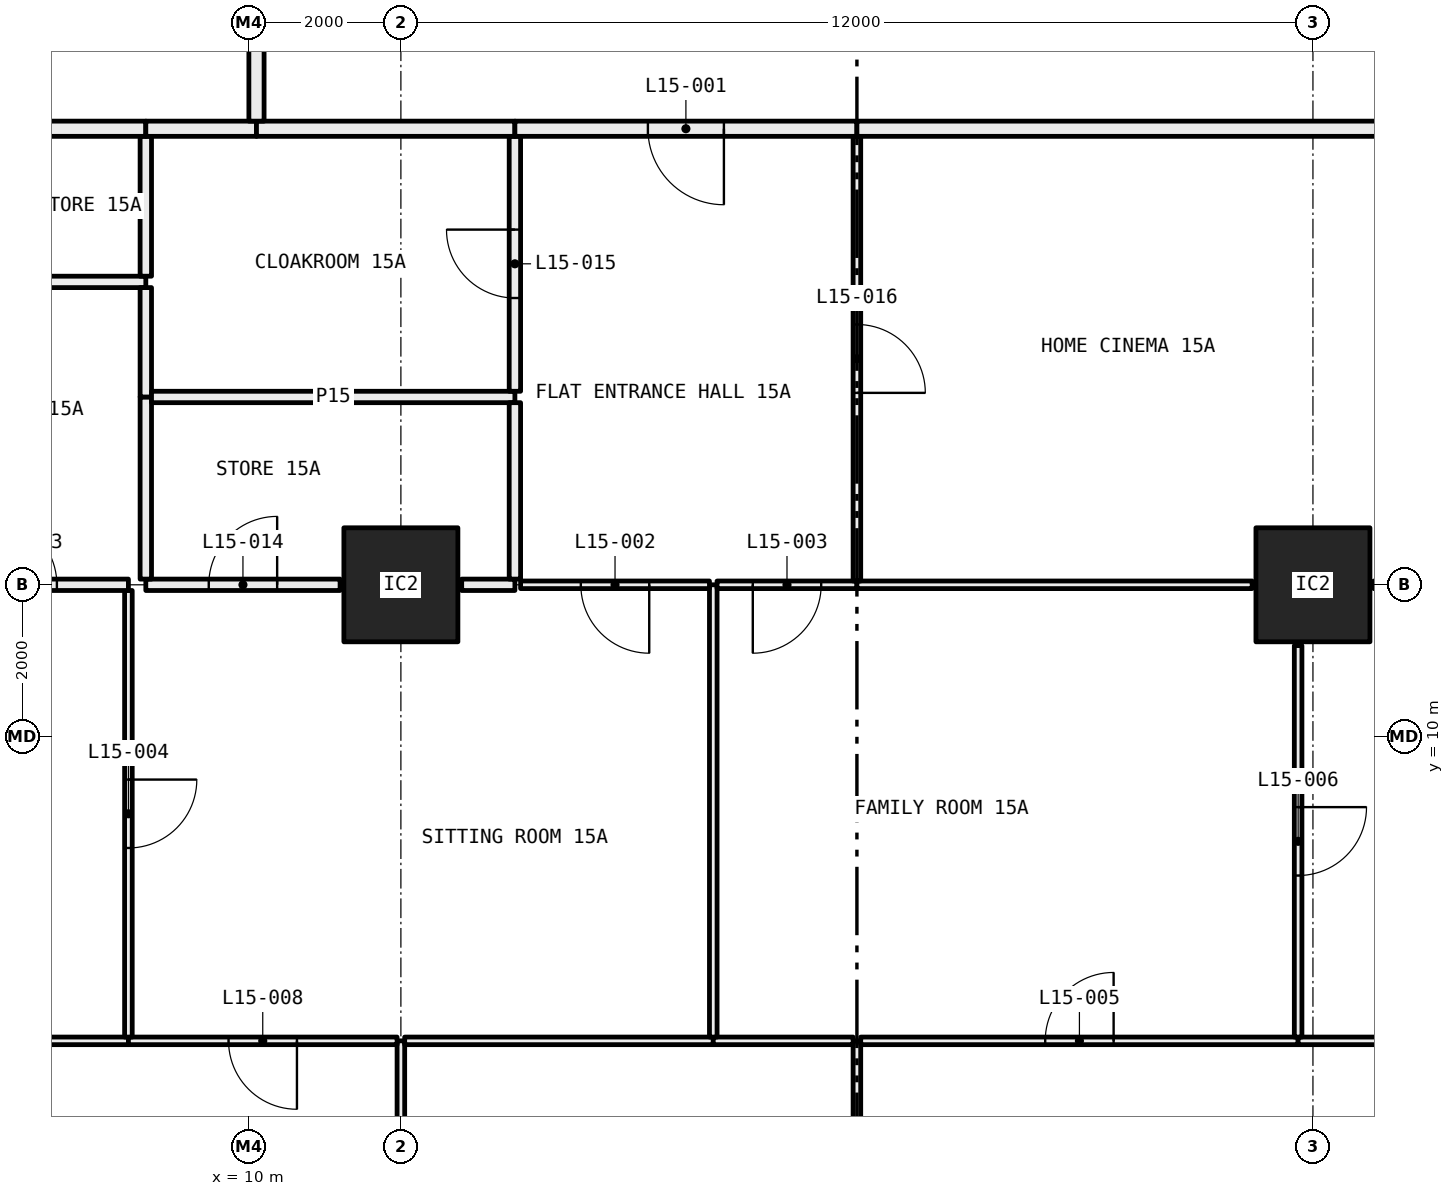
"""IFC4 building model, lengths in metres.
Left out: names, types, materials, properties, quantities, classifications, styles, units other than length and angle.
Written with IfcOpenShell. Run it as: python <this file> out.ifc"""

import sys

from ifc_helpers import new_model, si_unit, direction, frame, frame_2d, origin, origin_2d, place, context, subcontext, project, spatial, rectangle, hollow_rectangle, extrude, element, fill, save


model = new_model("IFC4")
c1 = context("Model", 3, precision=1e-05, world=origin(), true_north=direction((0.0, 1.0)))
c2 = subcontext(c1, "Body", "Model", "MODEL_VIEW")
j1 = project(units=[si_unit("LENGTHUNIT", "METRE"), si_unit("PLANEANGLEUNIT", "RADIAN")], contexts=[c1])
p1 = place(None, origin())
s1 = spatial("IfcSite", under=j1, at=p1, CompositionType="ELEMENT")
p2 = place(p1, origin())
s2 = spatial("IfcBuilding", under=s1, at=p2, CompositionType="ELEMENT")
p3 = place(p2, frame((0.0, 0.0, 64.5)))
s3 = spatial("IfcBuildingStorey", under=s2, at=p3, CompositionType="ELEMENT", Elevation=64.5)
for number, where, z_axis, x_axis in (
    (1, (12.0, 12.0, 0.0), (0.0, 0.0, 1.0), (1.0, 0.0, 0.0)),
    (2, (24.0, 12.0, 0.0), (0.0, 0.0, 1.0), (1.0, 0.0, 0.0)),
):
    element("IfcColumn", number, at=place(p3, frame(where, z_axis=z_axis, x_axis=x_axis)), inside=s3, PredefinedType="COLUMN", context=c2, shape_type="SweptSolid", body=[
        extrude(hollow_rectangle(XDim=1.5, YDim=1.5, WallThickness=0.065, at=origin_2d()), origin(), (0.0, 0.0, 1.0), 3.05),
    ])
p4 = place(p3, frame((12.0, 0.72, 0.0), z_axis=(0.0, 0.0, 1.0), x_axis=(0.0, 1.0, 0.0)))
e3 = element("IfcWall", 3, at=p4, inside=s3, PredefinedType="PARTITIONING", context=c2, shape_type="SweptSolid", body=[
    extrude(rectangle(XDim=5.28, YDim=0.1, at=frame_2d((2.64, 0.0))), origin(), (0.0, 0.0, 1.0), 2.45),
])
p5 = place(p3, frame((8.415, 6.0, 0.0), z_axis=(0.0, 0.0, 1.0), x_axis=(-1.0, 0.0, 0.0)))
e4 = element("IfcWall", 4, at=p5, inside=s3, PredefinedType="PARTITIONING", context=c2, shape_type="SweptSolid", body=[
    extrude(rectangle(XDim=1.695, YDim=0.1, at=frame_2d((0.848, 0.0))), origin(), (0.0, 0.0, 1.0), 3.05),
])
p6 = place(p3, frame((11.95, 6.0, 0.0), z_axis=(0.0, 0.0, 1.0), x_axis=(-1.0, 0.0, 0.0)))
e5 = element("IfcWall", 5, at=p6, inside=s3, PredefinedType="PARTITIONING", context=c2, shape_type="SweptSolid", body=[
    extrude(rectangle(XDim=3.535, YDim=0.1, at=frame_2d((1.768, 0.0))), origin(), (0.0, 0.0, 1.0), 2.45),
])
p7 = place(p6, frame((1.317, 0.0, 0.0)))
e6 = element("IfcOpeningElement", 6, at=p7, cuts=e5, PredefinedType="OPENING", context=c2, shape_type="SweptSolid", body=[
    extrude(rectangle(XDim=0.9, YDim=2.1, at=frame_2d((0.45, 1.05))), frame((0.0, 0.06, 0.0), z_axis=(0.0, -1.0, 0.0), x_axis=(1.0, 0.0, 0.0)), (0.0, 0.0, 1.0), 0.12),
])
p8 = place(p3, frame((18.0, 0.72, 0.0), z_axis=(0.0, 0.0, 1.0), x_axis=(0.0, 1.0, 0.0)))
e7 = element("IfcWall", 7, at=p8, inside=s3, PredefinedType="PARTITIONING", context=c2, shape_type="SweptSolid", body=[
    extrude(rectangle(XDim=5.28, YDim=0.1, at=frame_2d((2.64, 0.0))), origin(), (0.0, 0.0, 1.0), 3.05),
])
p9 = place(p8, frame((2.19, 0.0, 0.0)))
e8 = element("IfcOpeningElement", 8, at=p9, cuts=e7, PredefinedType="OPENING", context=c2, shape_type="SweptSolid", body=[
    extrude(rectangle(XDim=0.9, YDim=2.1, at=frame_2d((0.45, 1.05))), frame((0.0, 0.06, 0.0), z_axis=(0.0, -1.0, 0.0), x_axis=(1.0, 0.0, 0.0)), (0.0, 0.0, 1.0), 0.12),
])
p10 = place(p3, frame((16.11, 6.0, 0.0), z_axis=(0.0, 0.0, 1.0), x_axis=(-1.0, 0.0, 0.0)))
e9 = element("IfcWall", 9, at=p10, inside=s3, PredefinedType="PARTITIONING", context=c2, shape_type="SweptSolid", body=[
    extrude(rectangle(XDim=4.06, YDim=0.1, at=frame_2d((2.03, 0.0))), origin(), (0.0, 0.0, 1.0), 2.45),
])
p11 = place(p3, frame((17.95, 6.0, 0.0), z_axis=(0.0, 0.0, 1.0), x_axis=(-1.0, 0.0, 0.0)))
e10 = element("IfcWall", 10, at=p11, inside=s3, PredefinedType="PARTITIONING", context=c2, shape_type="SweptSolid", body=[
    extrude(rectangle(XDim=1.84, YDim=0.1, at=frame_2d((0.92, 0.0))), origin(), (0.0, 0.0, 1.0), 3.05),
])
p12 = place(p3, frame((23.805, 6.0, 0.0), z_axis=(0.0, 0.0, 1.0), x_axis=(-1.0, 0.0, 0.0)))
e11 = element("IfcWall", 11, at=p12, inside=s3, PredefinedType="PARTITIONING", context=c2, shape_type="SweptSolid", body=[
    extrude(rectangle(XDim=5.755, YDim=0.1, at=frame_2d((2.877, 0.0))), origin(), (0.0, 0.0, 1.0), 3.05),
])
p13 = place(p12, frame((2.427, 0.0, 0.0)))
e12 = element("IfcOpeningElement", 12, at=p13, cuts=e11, PredefinedType="OPENING", context=c2, shape_type="SweptSolid", body=[
    extrude(rectangle(XDim=0.9, YDim=2.1, at=frame_2d((0.45, 1.05))), frame((0.0, 0.06, 0.0), z_axis=(0.0, -1.0, 0.0), x_axis=(1.0, 0.0, 0.0)), (0.0, 0.0, 1.0), 0.12),
])
p14 = place(p3, frame((29.95, 6.0, 0.0), z_axis=(0.0, 0.0, 1.0), x_axis=(-1.0, 0.0, 0.0)))
e13 = element("IfcWall", 13, at=p14, inside=s3, PredefinedType="PARTITIONING", context=c2, shape_type="SweptSolid", body=[
    extrude(rectangle(XDim=6.145, YDim=0.1, at=frame_2d((3.073, 0.0))), origin(), (0.0, 0.0, 1.0), 2.45),
])
p15 = place(p3, frame((8.415, 6.05, 0.0), z_axis=(0.0, 0.0, 1.0), x_axis=(0.0, 1.0, 0.0)))
e14 = element("IfcWall", 14, at=p15, inside=s3, PredefinedType="PARTITIONING", context=c2, shape_type="SweptSolid", body=[
    extrude(rectangle(XDim=5.875, YDim=0.1, at=frame_2d((2.938, 0.0))), origin(), (0.0, 0.0, 1.0), 2.45),
])
p16 = place(p15, frame((2.488, 0.0, 0.0)))
e15 = element("IfcOpeningElement", 15, at=p16, cuts=e14, PredefinedType="OPENING", context=c2, shape_type="SweptSolid", body=[
    extrude(rectangle(XDim=0.9, YDim=2.1, at=frame_2d((0.45, 1.05))), frame((0.0, 0.06, 0.0), z_axis=(0.0, -1.0, 0.0), x_axis=(1.0, 0.0, 0.0)), (0.0, 0.0, 1.0), 0.12),
])
p17 = place(p3, frame((8.415, 12.0, 0.0), z_axis=(0.0, 0.0, 1.0), x_axis=(-1.0, 0.0, 0.0)))
e16 = element("IfcWall", 16, at=p17, inside=s3, PredefinedType="PARTITIONING", context=c2, shape_type="SweptSolid", body=[
    extrude(rectangle(XDim=2.782, YDim=0.15, at=frame_2d((1.391, 0.0))), origin(), (0.0, 0.0, 1.0), 2.45),
])
p18 = place(p17, frame((0.941, 0.0, 0.0)))
e17 = element("IfcOpeningElement", 17, at=p18, cuts=e16, PredefinedType="OPENING", context=c2, shape_type="SweptSolid", body=[
    extrude(rectangle(XDim=0.9, YDim=2.1, at=frame_2d((0.45, 1.05))), frame((0.0, 0.085, 0.0), z_axis=(0.0, -1.0, 0.0), x_axis=(1.0, 0.0, 0.0)), (0.0, 0.0, 1.0), 0.17),
])
p19 = place(p3, frame((16.11, 6.05, 0.0), z_axis=(0.0, 0.0, 1.0), x_axis=(0.0, 1.0, 0.0)))
e18 = element("IfcWall", 18, at=p19, inside=s3, PredefinedType="PARTITIONING", context=c2, shape_type="SweptSolid", body=[
    extrude(rectangle(XDim=5.95, YDim=0.1, at=frame_2d((2.975, 0.0))), origin(), (0.0, 0.0, 1.0), 2.45),
])
p20 = place(p3, frame((11.2, 12.0, 0.0), z_axis=(0.0, 0.0, 1.0), x_axis=(-1.0, 0.0, 0.0)))
e19 = element("IfcWall", 19, at=p20, inside=s3, PredefinedType="PARTITIONING", context=c2, shape_type="SweptSolid", body=[
    extrude(rectangle(XDim=2.556, YDim=0.15, at=frame_2d((1.278, 0.0))), origin(), (0.0, 0.0, 1.0), 2.45),
])
p21 = place(p20, frame((0.828, 0.0, 0.0)))
e20 = element("IfcOpeningElement", 20, at=p21, cuts=e19, PredefinedType="OPENING", context=c2, shape_type="SweptSolid", body=[
    extrude(rectangle(XDim=0.9, YDim=2.1, at=frame_2d((0.45, 1.05))), frame((0.0, 0.085, 0.0), z_axis=(0.0, -1.0, 0.0), x_axis=(1.0, 0.0, 0.0)), (0.0, 0.0, 1.0), 0.17),
])
p22 = place(p3, frame((13.5, 12.0, 0.0), z_axis=(0.0, 0.0, 1.0), x_axis=(-1.0, 0.0, 0.0)))
e21 = element("IfcWall", 21, at=p22, inside=s3, PredefinedType="PARTITIONING", context=c2, shape_type="SweptSolid", body=[
    extrude(rectangle(XDim=0.7, YDim=0.15, at=frame_2d((0.35, 0.0))), origin(), (0.0, 0.0, 1.0), 2.45),
])
p23 = place(p3, frame((16.06, 12.0, 0.0), z_axis=(0.0, 0.0, 1.0), x_axis=(-1.0, 0.0, 0.0)))
e22 = element("IfcWall", 22, at=p23, inside=s3, PredefinedType="PARTITIONING", context=c2, shape_type="SweptSolid", body=[
    extrude(rectangle(XDim=2.485, YDim=0.1, at=frame_2d((1.243, 0.0))), origin(), (0.0, 0.0, 1.0), 2.45),
])
p24 = place(p23, frame((0.792, 0.0, 0.0)))
e23 = element("IfcOpeningElement", 23, at=p24, cuts=e22, PredefinedType="OPENING", context=c2, shape_type="SweptSolid", body=[
    extrude(rectangle(XDim=0.9, YDim=2.1, at=frame_2d((0.45, 1.05))), frame((0.0, 0.06, 0.0), z_axis=(0.0, -1.0, 0.0), x_axis=(1.0, 0.0, 0.0)), (0.0, 0.0, 1.0), 0.12),
])
p25 = place(p3, frame((23.805, 6.05, 0.0), z_axis=(0.0, 0.0, 1.0), x_axis=(0.0, 1.0, 0.0)))
e24 = element("IfcWall", 24, at=p25, inside=s3, PredefinedType="PARTITIONING", context=c2, shape_type="SweptSolid", body=[
    extrude(rectangle(XDim=5.15, YDim=0.1, at=frame_2d((2.575, 0.0))), origin(), (0.0, 0.0, 1.0), 3.05),
])
p26 = place(p25, frame((2.125, 0.0, 0.0)))
e25 = element("IfcOpeningElement", 25, at=p26, cuts=e24, PredefinedType="OPENING", context=c2, shape_type="SweptSolid", body=[
    extrude(rectangle(XDim=0.9, YDim=2.1, at=frame_2d((0.45, 1.05))), frame((0.0, 0.06, 0.0), z_axis=(0.0, -1.0, 0.0), x_axis=(1.0, 0.0, 0.0)), (0.0, 0.0, 1.0), 0.12),
])
p27 = place(p3, frame((18.0, 12.0, 0.0), z_axis=(0.0, 0.0, 1.0), x_axis=(-1.0, 0.0, 0.0)))
e26 = element("IfcWall", 26, at=p27, inside=s3, PredefinedType="PARTITIONING", context=c2, shape_type="SweptSolid", body=[
    extrude(rectangle(XDim=1.84, YDim=0.1, at=frame_2d((0.92, 0.0))), origin(), (0.0, 0.0, 1.0), 2.45),
])
p28 = place(p27, frame((0.47, 0.0, 0.0)))
e27 = element("IfcOpeningElement", 27, at=p28, cuts=e26, PredefinedType="OPENING", context=c2, shape_type="SweptSolid", body=[
    extrude(rectangle(XDim=0.9, YDim=2.1, at=frame_2d((0.45, 1.05))), frame((0.0, 0.06, 0.0), z_axis=(0.0, -1.0, 0.0), x_axis=(1.0, 0.0, 0.0)), (0.0, 0.0, 1.0), 0.12),
])
p29 = place(p3, frame((23.2, 12.0, 0.0), z_axis=(0.0, 0.0, 1.0), x_axis=(-1.0, 0.0, 0.0)))
e28 = element("IfcWall", 28, at=p29, inside=s3, PredefinedType="PARTITIONING", context=c2, shape_type="SweptSolid", body=[
    extrude(rectangle(XDim=5.2, YDim=0.1, at=frame_2d((2.6, 0.0))), origin(), (0.0, 0.0, 1.0), 2.45),
])
p30 = place(p3, frame((27.0, 12.0, 0.0), z_axis=(0.0, 0.0, 1.0), x_axis=(-1.0, 0.0, 0.0)))
e29 = element("IfcWall", 29, at=p30, inside=s3, PredefinedType="PARTITIONING", context=c2, shape_type="SweptSolid", body=[
    extrude(rectangle(XDim=2.2, YDim=0.1, at=frame_2d((1.1, 0.0))), origin(), (0.0, 0.0, 1.0), 2.45),
])
p31 = place(p3, frame((8.644, 15.985, 0.0), z_axis=(0.0, 0.0, 1.0), x_axis=(-1.0, 0.0, 0.0)))
e30 = element("IfcWall", 30, at=p31, inside=s3, PredefinedType="PARTITIONING", context=c2, shape_type="SweptSolid", body=[
    extrude(rectangle(XDim=2.936, YDim=0.15, at=frame_2d((1.468, 0.0))), origin(), (0.0, 0.0, 1.0), 3.05),
])
p32 = place(p3, frame((8.644, 12.075, 0.0), z_axis=(0.0, 0.0, 1.0), x_axis=(0.0, 1.0, 0.0)))
e31 = element("IfcWall", 31, at=p32, inside=s3, PredefinedType="PARTITIONING", context=c2, shape_type="SweptSolid", body=[
    extrude(rectangle(XDim=2.396, YDim=0.15, at=frame_2d((1.198, 0.0))), origin(), (0.0, 0.0, 1.0), 2.45),
])
p33 = place(p3, frame((8.644, 14.471, 0.0), z_axis=(0.0, 0.0, 1.0), x_axis=(0.0, 1.0, 0.0)))
e32 = element("IfcWall", 32, at=p33, inside=s3, PredefinedType="PARTITIONING", context=c2, shape_type="SweptSolid", body=[
    extrude(rectangle(XDim=1.439, YDim=0.15, at=frame_2d((0.719, 0.0))), origin(), (0.0, 0.0, 1.0), 3.05),
])
p34 = place(p3, frame((8.644, 16.06, 0.0), z_axis=(0.0, 0.0, 1.0), x_axis=(0.0, 1.0, 0.0)))
e33 = element("IfcWall", 33, at=p34, inside=s3, PredefinedType="PARTITIONING", context=c2, shape_type="SweptSolid", body=[
    extrude(rectangle(XDim=1.84, YDim=0.15, at=frame_2d((0.92, 0.0))), origin(), (0.0, 0.0, 1.0), 3.05),
])
p35 = place(p3, frame((8.644, 18.0, 0.0), z_axis=(0.0, 0.0, 1.0), x_axis=(-1.0, 0.0, 0.0)))
e34 = element("IfcWall", 34, at=p35, inside=s3, PredefinedType="PARTITIONING", context=c2, shape_type="SweptSolid", body=[
    extrude(rectangle(XDim=2.644, YDim=0.2, at=frame_2d((1.322, 0.0))), origin(), (0.0, 0.0, 1.0), 3.05),
])
p36 = place(p3, frame((13.5, 14.471, 0.0), z_axis=(0.0, 0.0, 1.0), x_axis=(-1.0, 0.0, 0.0)))
e35 = element("IfcWall", 35, at=p36, inside=s3, PredefinedType="PARTITIONING", context=c2, shape_type="SweptSolid", body=[
    extrude(rectangle(XDim=4.781, YDim=0.15, at=frame_2d((2.391, 0.0))), origin(), (0.0, 0.0, 1.0), 3.05),
])
p37 = place(p3, frame((13.5, 12.075, 0.0), z_axis=(0.0, 0.0, 1.0), x_axis=(0.0, 1.0, 0.0)))
e36 = element("IfcWall", 36, at=p37, inside=s3, PredefinedType="PARTITIONING", context=c2, shape_type="SweptSolid", body=[
    extrude(rectangle(XDim=2.321, YDim=0.15, at=frame_2d((1.161, 0.0))), origin(), (0.0, 0.0, 1.0), 2.45),
])
p38 = place(p3, frame((13.5, 14.546, 0.0), z_axis=(0.0, 0.0, 1.0), x_axis=(0.0, 1.0, 0.0)))
e37 = element("IfcWall", 37, at=p38, inside=s3, PredefinedType="PARTITIONING", context=c2, shape_type="SweptSolid", body=[
    extrude(rectangle(XDim=3.354, YDim=0.15, at=frame_2d((1.677, 0.0))), origin(), (0.0, 0.0, 1.0), 3.05),
])
p39 = place(p38, frame((1.227, 0.0, 0.0)))
e38 = element("IfcOpeningElement", 38, at=p39, cuts=e37, PredefinedType="OPENING", context=c2, shape_type="SweptSolid", body=[
    extrude(rectangle(XDim=0.9, YDim=2.1, at=frame_2d((0.45, 1.05))), frame((0.0, 0.085, 0.0), z_axis=(0.0, -1.0, 0.0), x_axis=(1.0, 0.0, 0.0)), (0.0, 0.0, 1.0), 0.17),
])
p40 = place(p3, frame((10.1, 18.0, 0.0), z_axis=(0.0, 0.0, 1.0), x_axis=(-1.0, 0.0, 0.0)))
e39 = element("IfcWall", 39, at=p40, inside=s3, PredefinedType="PARTITIONING", context=c2, shape_type="SweptSolid", body=[
    extrude(rectangle(XDim=1.456, YDim=0.2, at=frame_2d((0.728, 0.0))), origin(), (0.0, 0.0, 1.0), 3.05),
])
p41 = place(p3, frame((13.5, 18.0, 0.0), z_axis=(0.0, 0.0, 1.0), x_axis=(-1.0, 0.0, 0.0)))
e40 = element("IfcWall", 40, at=p41, inside=s3, PredefinedType="PARTITIONING", context=c2, shape_type="SweptSolid", body=[
    extrude(rectangle(XDim=3.4, YDim=0.2, at=frame_2d((1.7, 0.0))), origin(), (0.0, 0.0, 1.0), 3.05),
])
p42 = place(p3, frame((18.0, 12.05, 0.0), z_axis=(0.0, 0.0, 1.0), x_axis=(0.0, 1.0, 0.0)))
e41 = element("IfcWall", 41, at=p42, inside=s3, PredefinedType="PARTITIONING", context=c2, shape_type="SweptSolid", body=[
    extrude(rectangle(XDim=5.85, YDim=0.1, at=frame_2d((2.925, 0.0))), origin(), (0.0, 0.0, 1.0), 2.45),
])
p43 = place(p42, frame((2.475, 0.0, 0.0)))
e42 = element("IfcOpeningElement", 42, at=p43, cuts=e41, PredefinedType="OPENING", context=c2, shape_type="SweptSolid", body=[
    extrude(rectangle(XDim=0.9, YDim=2.1, at=frame_2d((0.45, 1.05))), frame((0.0, 0.06, 0.0), z_axis=(0.0, -1.0, 0.0), x_axis=(1.0, 0.0, 0.0)), (0.0, 0.0, 1.0), 0.12),
])
p44 = place(p3, frame((18.0, 18.0, 0.0), z_axis=(0.0, 0.0, 1.0), x_axis=(-1.0, 0.0, 0.0)))
e43 = element("IfcWall", 43, at=p44, inside=s3, PredefinedType="PARTITIONING", context=c2, shape_type="SweptSolid", body=[
    extrude(rectangle(XDim=4.5, YDim=0.2, at=frame_2d((2.25, 0.0))), origin(), (0.0, 0.0, 1.0), 3.05),
])
p45 = place(p44, frame((1.75, 0.0, 0.0)))
e44 = element("IfcOpeningElement", 44, at=p45, cuts=e43, PredefinedType="OPENING", context=c2, shape_type="SweptSolid", body=[
    extrude(rectangle(XDim=1.0, YDim=2.1, at=frame_2d((0.5, 1.05))), frame((0.0, 0.11, 0.0), z_axis=(0.0, -1.0, 0.0), x_axis=(1.0, 0.0, 0.0)), (0.0, 0.0, 1.0), 0.22),
])
p46 = place(p3, frame((25.9, 18.0, 0.0), z_axis=(0.0, 0.0, 1.0), x_axis=(-1.0, 0.0, 0.0)))
e45 = element("IfcWall", 45, at=p46, inside=s3, PredefinedType="PARTITIONING", context=c2, shape_type="SweptSolid", body=[
    extrude(rectangle(XDim=7.9, YDim=0.2, at=frame_2d((3.95, 0.0))), origin(), (0.0, 0.0, 1.0), 3.05),
])
p47 = place(p3, frame((10.1, 18.1, 0.0), z_axis=(0.0, 0.0, 1.0), x_axis=(0.0, 1.0, 0.0)))
e46 = element("IfcWall", 46, at=p47, inside=s3, PredefinedType="PARTITIONING", context=c2, shape_type="SweptSolid", body=[
    extrude(rectangle(XDim=4.4, YDim=0.2, at=frame_2d((2.2, 0.0))), origin(), (0.0, 0.0, 1.0), 3.05),
])
p48 = place(p45, origin())
e47 = element("IfcDoor", 47, at=p48, inside=s3, OperationType="SINGLE_SWING_RIGHT", PredefinedType="DOOR", context=c2, shape_type="SweptSolid", body=[
    extrude(rectangle(XDim=1.0, YDim=2.1, at=frame_2d((0.5, 1.05))), frame((0.0, 0.025, 0.0), z_axis=(0.0, -1.0, 0.0), x_axis=(1.0, 0.0, 0.0)), (0.0, 0.0, 1.0), 0.05),
])
fill(e44, e47)
p49 = place(p24, origin())
e48 = element("IfcDoor", 48, at=p49, inside=s3, OperationType="SINGLE_SWING_RIGHT", PredefinedType="DOOR", context=c2, shape_type="SweptSolid", body=[
    extrude(rectangle(XDim=0.9, YDim=2.1, at=frame_2d((0.45, 1.05))), frame((0.0, 0.025, 0.0), z_axis=(0.0, -1.0, 0.0), x_axis=(1.0, 0.0, 0.0)), (0.0, 0.0, 1.0), 0.05),
])
fill(e23, e48)
p50 = place(p28, origin())
e49 = element("IfcDoor", 49, at=p50, inside=s3, OperationType="SINGLE_SWING_LEFT", PredefinedType="DOOR", context=c2, shape_type="SweptSolid", body=[
    extrude(rectangle(XDim=0.9, YDim=2.1, at=frame_2d((0.45, 1.05))), frame((0.0, 0.025, 0.0), z_axis=(0.0, -1.0, 0.0), x_axis=(1.0, 0.0, 0.0)), (0.0, 0.0, 1.0), 0.05),
])
fill(e27, e49)
p51 = place(p16, frame((0.9, 0.0, 0.0), x_axis=(-1.0, 0.0, 0.0)))
e50 = element("IfcDoor", 50, at=p51, inside=s3, OperationType="SINGLE_SWING_RIGHT", PredefinedType="DOOR", context=c2, shape_type="SweptSolid", body=[
    extrude(rectangle(XDim=0.9, YDim=2.1, at=frame_2d((0.45, 1.05))), frame((0.0, 0.025, 0.0), z_axis=(0.0, -1.0, 0.0), x_axis=(1.0, 0.0, 0.0)), (0.0, 0.0, 1.0), 0.05),
])
fill(e15, e50)
p52 = place(p13, frame((0.9, 0.0, 0.0), x_axis=(-1.0, 0.0, 0.0)))
e51 = element("IfcDoor", 51, at=p52, inside=s3, OperationType="SINGLE_SWING_LEFT", PredefinedType="DOOR", context=c2, shape_type="SweptSolid", body=[
    extrude(rectangle(XDim=0.9, YDim=2.1, at=frame_2d((0.45, 1.05))), frame((0.0, 0.025, 0.0), z_axis=(0.0, -1.0, 0.0), x_axis=(1.0, 0.0, 0.0)), (0.0, 0.0, 1.0), 0.05),
])
fill(e12, e51)
p53 = place(p26, frame((0.9, 0.0, 0.0), x_axis=(-1.0, 0.0, 0.0)))
e52 = element("IfcDoor", 52, at=p53, inside=s3, OperationType="SINGLE_SWING_RIGHT", PredefinedType="DOOR", context=c2, shape_type="SweptSolid", body=[
    extrude(rectangle(XDim=0.9, YDim=2.1, at=frame_2d((0.45, 1.05))), frame((0.0, 0.025, 0.0), z_axis=(0.0, -1.0, 0.0), x_axis=(1.0, 0.0, 0.0)), (0.0, 0.0, 1.0), 0.05),
])
fill(e25, e52)
p54 = place(p7, origin())
e53 = element("IfcDoor", 53, at=p54, inside=s3, OperationType="SINGLE_SWING_RIGHT", PredefinedType="DOOR", context=c2, shape_type="SweptSolid", body=[
    extrude(rectangle(XDim=0.9, YDim=2.1, at=frame_2d((0.45, 1.05))), frame((0.0, 0.025, 0.0), z_axis=(0.0, -1.0, 0.0), x_axis=(1.0, 0.0, 0.0)), (0.0, 0.0, 1.0), 0.05),
])
fill(e6, e53)
p55 = place(p18, frame((0.9, 0.0, 0.0), x_axis=(-1.0, 0.0, 0.0)))
e54 = element("IfcDoor", 54, at=p55, inside=s3, OperationType="SINGLE_SWING_RIGHT", PredefinedType="DOOR", context=c2, shape_type="SweptSolid", body=[
    extrude(rectangle(XDim=0.9, YDim=2.1, at=frame_2d((0.45, 1.05))), frame((0.0, 0.025, 0.0), z_axis=(0.0, -1.0, 0.0), x_axis=(1.0, 0.0, 0.0)), (0.0, 0.0, 1.0), 0.05),
])
fill(e17, e54)
p56 = place(p21, frame((0.9, 0.0, 0.0), x_axis=(-1.0, 0.0, 0.0)))
e55 = element("IfcDoor", 55, at=p56, inside=s3, OperationType="SINGLE_SWING_LEFT", PredefinedType="DOOR", context=c2, shape_type="SweptSolid", body=[
    extrude(rectangle(XDim=0.9, YDim=2.1, at=frame_2d((0.45, 1.05))), frame((0.0, 0.025, 0.0), z_axis=(0.0, -1.0, 0.0), x_axis=(1.0, 0.0, 0.0)), (0.0, 0.0, 1.0), 0.05),
])
fill(e20, e55)
p57 = place(p39, origin())
e56 = element("IfcDoor", 56, at=p57, inside=s3, OperationType="SINGLE_SWING_LEFT", PredefinedType="DOOR", context=c2, shape_type="SweptSolid", body=[
    extrude(rectangle(XDim=0.9, YDim=2.1, at=frame_2d((0.45, 1.05))), frame((0.0, 0.025, 0.0), z_axis=(0.0, -1.0, 0.0), x_axis=(1.0, 0.0, 0.0)), (0.0, 0.0, 1.0), 0.05),
])
fill(e38, e56)
p58 = place(p43, frame((0.9, 0.0, 0.0), x_axis=(-1.0, 0.0, 0.0)))
e57 = element("IfcDoor", 57, at=p58, inside=s3, OperationType="SINGLE_SWING_LEFT", PredefinedType="DOOR", context=c2, shape_type="SweptSolid", body=[
    extrude(rectangle(XDim=0.9, YDim=2.1, at=frame_2d((0.45, 1.05))), frame((0.0, 0.025, 0.0), z_axis=(0.0, -1.0, 0.0), x_axis=(1.0, 0.0, 0.0)), (0.0, 0.0, 1.0), 0.05),
])
fill(e42, e57)
save(model, sys.argv[1])
